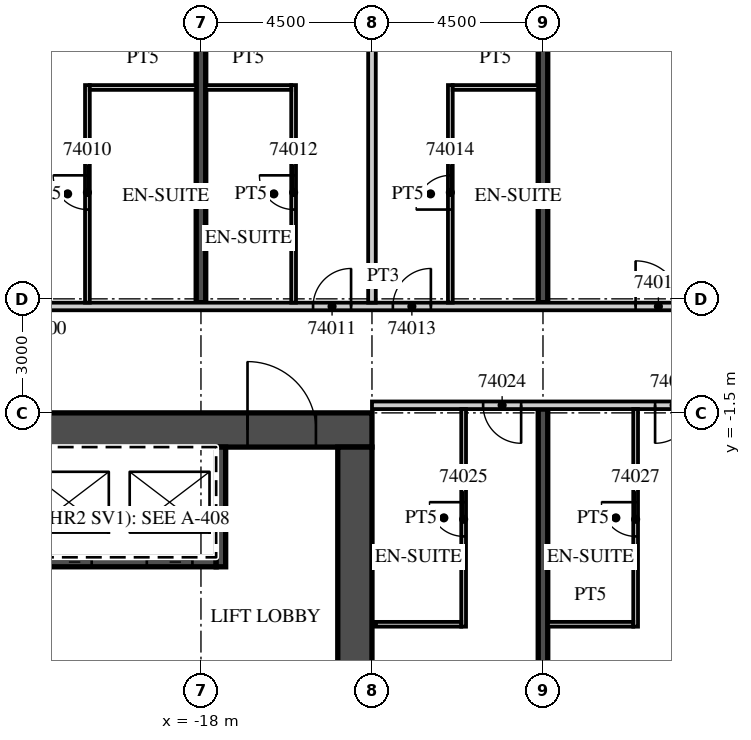
"""IFC4 building model, lengths in metres.
Left out: names, types, materials, properties, quantities, classifications, styles, units other than length and angle.
Written with IfcOpenShell. Run it as: python <this file> out.ifc"""

import sys

from ifc_helpers import new_model, si_unit, direction, frame, frame_2d, origin, place, context, subcontext, project, spatial, rectangle, extrude, element, fill, save


model = new_model("IFC4")
c1 = context("Model", 3, precision=1e-05, world=origin(), true_north=direction((0.0, 1.0)))
c2 = subcontext(c1, "Body", "Model", "MODEL_VIEW")
j1 = project(units=[si_unit("LENGTHUNIT", "METRE"), si_unit("PLANEANGLEUNIT", "RADIAN")], contexts=[c1])
p1 = place(None, origin())
s1 = spatial("IfcSite", under=j1, at=p1, CompositionType="ELEMENT")
p2 = place(p1, origin())
s2 = spatial("IfcBuilding", under=s1, at=p2, CompositionType="ELEMENT")
p3 = place(p2, frame((0.0, 0.0, 294.9)))
s3 = spatial("IfcBuildingStorey", under=s2, at=p3, CompositionType="ELEMENT", Elevation=294.9)
p4 = place(p3, frame((-18.0, 1.4, 0.0), z_axis=(0.0, 0.0, 1.0), x_axis=(0.0, 1.0, 0.0)))
e1 = element("IfcWall", 1, at=p4, inside=s3, PredefinedType="SHEAR", context=c2, shape_type="SweptSolid", body=[
    extrude(rectangle(XDim=16.03, YDim=0.25, at=frame_2d((8.015, 0.0))), origin(), (0.0, 0.0, 1.0), 3.3),
])
p5 = place(p3, frame((-9.0, -20.94, 0.0), z_axis=(0.0, 0.0, 1.0), x_axis=(0.0, 1.0, 0.0)))
e2 = element("IfcWall", 2, at=p5, inside=s3, PredefinedType="SHEAR", context=c2, shape_type="SweptSolid", body=[
    extrude(rectangle(XDim=19.541, YDim=0.25, at=frame_2d((9.77, 0.0))), origin(), (0.0, 0.0, 1.0), 3.3),
])
p6 = place(p3, frame((-9.0, 1.4, 0.0), z_axis=(0.0, 0.0, 1.0), x_axis=(0.0, 1.0, 0.0)))
e3 = element("IfcWall", 3, at=p6, inside=s3, PredefinedType="SHEAR", context=c2, shape_type="SweptSolid", body=[
    extrude(rectangle(XDim=16.896, YDim=0.25, at=frame_2d((8.448, 0.0))), origin(), (0.0, 0.0, 1.0), 3.3),
])
p7 = place(p3, frame((-39.909, 1.3, 0.0), z_axis=(0.0, 0.0, 1.0), x_axis=(1.0, 0.0, 0.0)))
e4 = element("IfcWall", 4, at=p7, inside=s3, PredefinedType="PARTITIONING", context=c2, shape_type="SweptSolid", body=[
    extrude(rectangle(XDim=53.409, YDim=0.2, at=frame_2d((26.705, 0.0))), origin(), (0.0, 0.0, 1.0), 3.02),
])
p8 = place(p7, frame((0.255, 0.0, 0.0)))
e5 = element("IfcOpeningElement", 5, at=p8, cuts=e4, PredefinedType="OPENING", context=c2, shape_type="SweptSolid", body=[
    extrude(rectangle(XDim=0.9, YDim=2.1, at=frame_2d((0.45, 1.05))), frame((0.0, 0.11, 0.0), z_axis=(0.0, -1.0, 0.0), x_axis=(1.0, 0.0, 0.0)), (0.0, 0.0, 1.0), 0.22),
])
p9 = place(p7, frame((4.484, 0.0, 0.0)))
e6 = element("IfcOpeningElement", 6, at=p9, cuts=e4, PredefinedType="OPENING", context=c2, shape_type="SweptSolid", body=[
    extrude(rectangle(XDim=1.0, YDim=2.1, at=frame_2d((0.5, 1.05))), frame((0.0, 0.11, 0.0), z_axis=(0.0, -1.0, 0.0), x_axis=(1.0, 0.0, 0.0)), (0.0, 0.0, 1.0), 0.22),
])
p10 = place(p7, frame((11.334, 0.0, 0.0)))
e7 = element("IfcOpeningElement", 7, at=p10, cuts=e4, PredefinedType="OPENING", context=c2, shape_type="SweptSolid", body=[
    extrude(rectangle(XDim=1.0, YDim=2.1, at=frame_2d((0.5, 1.05))), frame((0.0, 0.11, 0.0), z_axis=(0.0, -1.0, 0.0), x_axis=(1.0, 0.0, 0.0)), (0.0, 0.0, 1.0), 0.22),
])
p11 = place(p7, frame((15.347, 0.0, 0.0)))
e8 = element("IfcOpeningElement", 8, at=p11, cuts=e4, PredefinedType="OPENING", context=c2, shape_type="SweptSolid", body=[
    extrude(rectangle(XDim=1.2, YDim=2.1, at=frame_2d((0.6, 1.05))), frame((0.0, 0.11, 0.0), z_axis=(0.0, -1.0, 0.0), x_axis=(1.0, 0.0, 0.0)), (0.0, 0.0, 1.0), 0.22),
])
p12 = place(p7, frame((24.859, 0.0, 0.0)))
e9 = element("IfcOpeningElement", 9, at=p12, cuts=e4, PredefinedType="OPENING", context=c2, shape_type="SweptSolid", body=[
    extrude(rectangle(XDim=1.0, YDim=2.1, at=frame_2d((0.5, 1.05))), frame((0.0, 0.11, 0.0), z_axis=(0.0, -1.0, 0.0), x_axis=(1.0, 0.0, 0.0)), (0.0, 0.0, 1.0), 0.22),
])
p13 = place(p7, frame((26.959, 0.0, 0.0)))
e10 = element("IfcOpeningElement", 10, at=p13, cuts=e4, PredefinedType="OPENING", context=c2, shape_type="SweptSolid", body=[
    extrude(rectangle(XDim=1.0, YDim=2.1, at=frame_2d((0.5, 1.05))), frame((0.0, 0.11, 0.0), z_axis=(0.0, -1.0, 0.0), x_axis=(1.0, 0.0, 0.0)), (0.0, 0.0, 1.0), 0.22),
])
p14 = place(p7, frame((33.346, 0.0, 0.0)))
e11 = element("IfcOpeningElement", 11, at=p14, cuts=e4, PredefinedType="OPENING", context=c2, shape_type="SweptSolid", body=[
    extrude(rectangle(XDim=1.2, YDim=2.1, at=frame_2d((0.6, 1.05))), frame((0.0, 0.11, 0.0), z_axis=(0.0, -1.0, 0.0), x_axis=(1.0, 0.0, 0.0)), (0.0, 0.0, 1.0), 0.22),
])
p15 = place(p7, frame((42.859, 0.0, 0.0)))
e12 = element("IfcOpeningElement", 12, at=p15, cuts=e4, PredefinedType="OPENING", context=c2, shape_type="SweptSolid", body=[
    extrude(rectangle(XDim=1.0, YDim=2.1, at=frame_2d((0.5, 1.05))), frame((0.0, 0.11, 0.0), z_axis=(0.0, -1.0, 0.0), x_axis=(1.0, 0.0, 0.0)), (0.0, 0.0, 1.0), 0.22),
])
p16 = place(p7, frame((44.959, 0.0, 0.0)))
e13 = element("IfcOpeningElement", 13, at=p16, cuts=e4, PredefinedType="OPENING", context=c2, shape_type="SweptSolid", body=[
    extrude(rectangle(XDim=1.0, YDim=2.1, at=frame_2d((0.5, 1.05))), frame((0.0, 0.11, 0.0), z_axis=(0.0, -1.0, 0.0), x_axis=(1.0, 0.0, 0.0)), (0.0, 0.0, 1.0), 0.22),
])
p17 = place(p7, frame((49.484, 0.0, 0.0)))
e14 = element("IfcOpeningElement", 14, at=p17, cuts=e4, PredefinedType="OPENING", context=c2, shape_type="SweptSolid", body=[
    extrude(rectangle(XDim=1.0, YDim=2.1, at=frame_2d((0.5, 1.05))), frame((0.0, 0.11, 0.0), z_axis=(0.0, -1.0, 0.0), x_axis=(1.0, 0.0, 0.0)), (0.0, 0.0, 1.0), 0.22),
])
p18 = place(p3, frame((-20.988, 1.4, 0.0), z_axis=(0.0, 0.0, 1.0), x_axis=(0.0, 1.0, 0.0)))
e15 = element("IfcWall", 15, at=p18, inside=s3, PredefinedType="PARTITIONING", context=c2, shape_type="SweptSolid", body=[
    extrude(rectangle(XDim=5.725, YDim=0.125, at=frame_2d((2.863, 0.0))), origin(), (0.0, 0.0, 1.0), 3.02),
])
p19 = place(p18, frame((2.45, 0.0, 0.0)))
e16 = element("IfcOpeningElement", 16, at=p19, cuts=e15, PredefinedType="OPENING", context=c2, shape_type="SweptSolid", body=[
    extrude(rectangle(XDim=0.9, YDim=2.1, at=frame_2d((0.45, 1.05))), frame((0.0, 0.073, 0.0), z_axis=(0.0, -1.0, 0.0), x_axis=(1.0, 0.0, 0.0)), (0.0, 0.0, 1.0), 0.145),
])
p20 = place(p3, frame((-20.925, 7.062, 0.0), z_axis=(0.0, 0.0, 1.0), x_axis=(1.0, 0.0, 0.0)))
e17 = element("IfcWall", 17, at=p20, inside=s3, PredefinedType="PARTITIONING", context=c2, shape_type="SweptSolid", body=[
    extrude(rectangle(XDim=2.8, YDim=0.125, at=frame_2d((1.4, 0.0))), origin(), (0.0, 0.0, 1.0), 3.02),
])
p21 = place(p3, frame((-13.5, 1.4, 0.0), z_axis=(0.0, 0.0, 1.0), x_axis=(0.0, 1.0, 0.0)))
e18 = element("IfcWall", 18, at=p21, inside=s3, PredefinedType="PARTITIONING", context=c2, shape_type="SweptSolid", body=[
    extrude(rectangle(XDim=16.485, YDim=0.2, at=frame_2d((8.243, 0.0))), origin(), (0.0, 0.0, 1.0), 3.02),
])
p22 = place(p3, frame((-15.562, 1.4, 0.0), z_axis=(0.0, 0.0, 1.0), x_axis=(0.0, 1.0, 0.0)))
e19 = element("IfcWall", 19, at=p22, inside=s3, PredefinedType="PARTITIONING", context=c2, shape_type="SweptSolid", body=[
    extrude(rectangle(XDim=5.725, YDim=0.125, at=frame_2d((2.863, 0.0))), origin(), (0.0, 0.0, 1.0), 3.02),
])
p23 = place(p22, frame((2.45, 0.0, 0.0)))
e20 = element("IfcOpeningElement", 20, at=p23, cuts=e19, PredefinedType="OPENING", context=c2, shape_type="SweptSolid", body=[
    extrude(rectangle(XDim=0.9, YDim=2.1, at=frame_2d((0.45, 1.05))), frame((0.0, 0.073, 0.0), z_axis=(0.0, -1.0, 0.0), x_axis=(1.0, 0.0, 0.0)), (0.0, 0.0, 1.0), 0.145),
])
p24 = place(p3, frame((-17.875, 7.062, 0.0), z_axis=(0.0, 0.0, 1.0), x_axis=(1.0, 0.0, 0.0)))
e21 = element("IfcWall", 21, at=p24, inside=s3, PredefinedType="PARTITIONING", context=c2, shape_type="SweptSolid", body=[
    extrude(rectangle(XDim=2.25, YDim=0.125, at=frame_2d((1.125, 0.0))), origin(), (0.0, 0.0, 1.0), 3.02),
])
p25 = place(p3, frame((-11.438, 1.4, 0.0), z_axis=(0.0, 0.0, 1.0), x_axis=(0.0, 1.0, 0.0)))
e22 = element("IfcWall", 22, at=p25, inside=s3, PredefinedType="PARTITIONING", context=c2, shape_type="SweptSolid", body=[
    extrude(rectangle(XDim=5.725, YDim=0.125, at=frame_2d((2.863, 0.0))), origin(), (0.0, 0.0, 1.0), 3.02),
])
p26 = place(p25, frame((2.45, 0.0, 0.0)))
e23 = element("IfcOpeningElement", 23, at=p26, cuts=e22, PredefinedType="OPENING", context=c2, shape_type="SweptSolid", body=[
    extrude(rectangle(XDim=0.9, YDim=2.1, at=frame_2d((0.45, 1.05))), frame((0.0, 0.073, 0.0), z_axis=(0.0, -1.0, 0.0), x_axis=(1.0, 0.0, 0.0)), (0.0, 0.0, 1.0), 0.145),
])
p27 = place(p3, frame((-11.375, 7.062, 0.0), z_axis=(0.0, 0.0, 1.0), x_axis=(1.0, 0.0, 0.0)))
e24 = element("IfcWall", 24, at=p27, inside=s3, PredefinedType="PARTITIONING", context=c2, shape_type="SweptSolid", body=[
    extrude(rectangle(XDim=2.25, YDim=0.125, at=frame_2d((1.125, 0.0))), origin(), (0.0, 0.0, 1.0), 3.02),
])
p28 = place(p3, frame((-13.5, -1.3, 0.0), z_axis=(0.0, 0.0, 1.0), x_axis=(1.0, 0.0, 0.0)))
e25 = element("IfcWall", 25, at=p28, inside=s3, PredefinedType="PARTITIONING", context=c2, shape_type="SweptSolid", body=[
    extrude(rectangle(XDim=50.293, YDim=0.2, at=frame_2d((25.146, 0.0))), origin(), (0.0, 0.0, 1.0), 3.02),
])
p29 = place(p28, frame((2.925, 0.0, 0.0)))
e26 = element("IfcOpeningElement", 26, at=p29, cuts=e25, PredefinedType="OPENING", context=c2, shape_type="SweptSolid", body=[
    extrude(rectangle(XDim=1.0, YDim=2.1, at=frame_2d((0.5, 1.05))), frame((0.0, 0.11, 0.0), z_axis=(0.0, -1.0, 0.0), x_axis=(1.0, 0.0, 0.0)), (0.0, 0.0, 1.0), 0.22),
])
p30 = place(p28, frame((7.45, 0.0, 0.0)))
e27 = element("IfcOpeningElement", 27, at=p30, cuts=e25, PredefinedType="OPENING", context=c2, shape_type="SweptSolid", body=[
    extrude(rectangle(XDim=1.0, YDim=2.1, at=frame_2d((0.5, 1.05))), frame((0.0, 0.11, 0.0), z_axis=(0.0, -1.0, 0.0), x_axis=(1.0, 0.0, 0.0)), (0.0, 0.0, 1.0), 0.22),
])
p31 = place(p28, frame((9.55, 0.0, 0.0)))
e28 = element("IfcOpeningElement", 28, at=p31, cuts=e25, PredefinedType="OPENING", context=c2, shape_type="SweptSolid", body=[
    extrude(rectangle(XDim=1.0, YDim=2.1, at=frame_2d((0.5, 1.05))), frame((0.0, 0.11, 0.0), z_axis=(0.0, -1.0, 0.0), x_axis=(1.0, 0.0, 0.0)), (0.0, 0.0, 1.0), 0.22),
])
p32 = place(p28, frame((18.862, 0.0, 0.0)))
e29 = element("IfcOpeningElement", 29, at=p32, cuts=e25, PredefinedType="OPENING", context=c2, shape_type="SweptSolid", body=[
    extrude(rectangle(XDim=1.2, YDim=2.1, at=frame_2d((0.6, 1.05))), frame((0.0, 0.11, 0.0), z_axis=(0.0, -1.0, 0.0), x_axis=(1.0, 0.0, 0.0)), (0.0, 0.0, 1.0), 0.22),
])
p33 = place(p28, frame((23.075, 0.0, 0.0)))
e30 = element("IfcOpeningElement", 30, at=p33, cuts=e25, PredefinedType="OPENING", context=c2, shape_type="SweptSolid", body=[
    extrude(rectangle(XDim=1.0, YDim=2.1, at=frame_2d((0.5, 1.05))), frame((0.0, 0.11, 0.0), z_axis=(0.0, -1.0, 0.0), x_axis=(1.0, 0.0, 0.0)), (0.0, 0.0, 1.0), 0.22),
])
p34 = place(p28, frame((29.925, 0.0, 0.0)))
e31 = element("IfcOpeningElement", 31, at=p34, cuts=e25, PredefinedType="OPENING", context=c2, shape_type="SweptSolid", body=[
    extrude(rectangle(XDim=1.0, YDim=2.1, at=frame_2d((0.5, 1.05))), frame((0.0, 0.11, 0.0), z_axis=(0.0, -1.0, 0.0), x_axis=(1.0, 0.0, 0.0)), (0.0, 0.0, 1.0), 0.22),
])
p35 = place(p28, frame((33.938, 0.0, 0.0)))
e32 = element("IfcOpeningElement", 32, at=p35, cuts=e25, PredefinedType="OPENING", context=c2, shape_type="SweptSolid", body=[
    extrude(rectangle(XDim=1.2, YDim=2.1, at=frame_2d((0.6, 1.05))), frame((0.0, 0.11, 0.0), z_axis=(0.0, -1.0, 0.0), x_axis=(1.0, 0.0, 0.0)), (0.0, 0.0, 1.0), 0.22),
])
p36 = place(p28, frame((43.45, 0.0, 0.0)))
e33 = element("IfcOpeningElement", 33, at=p36, cuts=e25, PredefinedType="OPENING", context=c2, shape_type="SweptSolid", body=[
    extrude(rectangle(XDim=1.0, YDim=2.1, at=frame_2d((0.5, 1.05))), frame((0.0, 0.11, 0.0), z_axis=(0.0, -1.0, 0.0), x_axis=(1.0, 0.0, 0.0)), (0.0, 0.0, 1.0), 0.22),
])
p37 = place(p28, frame((45.55, 0.0, 0.0)))
e34 = element("IfcOpeningElement", 34, at=p37, cuts=e25, PredefinedType="OPENING", context=c2, shape_type="SweptSolid", body=[
    extrude(rectangle(XDim=1.0, YDim=2.1, at=frame_2d((0.5, 1.05))), frame((0.0, 0.11, 0.0), z_axis=(0.0, -1.0, 0.0), x_axis=(1.0, 0.0, 0.0)), (0.0, 0.0, 1.0), 0.22),
])
p38 = place(p3, frame((-11.088, -7.125, 0.0), z_axis=(0.0, 0.0, 1.0), x_axis=(0.0, 1.0, 0.0)))
e35 = element("IfcWall", 35, at=p38, inside=s3, PredefinedType="PARTITIONING", context=c2, shape_type="SweptSolid", body=[
    extrude(rectangle(XDim=5.725, YDim=0.125, at=frame_2d((2.863, 0.0))), origin(), (0.0, 0.0, 1.0), 3.02),
])
p39 = place(p38, frame((2.375, 0.0, 0.0)))
e36 = element("IfcOpeningElement", 36, at=p39, cuts=e35, PredefinedType="OPENING", context=c2, shape_type="SweptSolid", body=[
    extrude(rectangle(XDim=0.9, YDim=2.1, at=frame_2d((0.45, 1.05))), frame((0.0, 0.073, 0.0), z_axis=(0.0, -1.0, 0.0), x_axis=(1.0, 0.0, 0.0)), (0.0, 0.0, 1.0), 0.145),
])
p40 = place(p3, frame((-13.4, -7.062, 0.0), z_axis=(0.0, 0.0, 1.0), x_axis=(1.0, 0.0, 0.0)))
e37 = element("IfcWall", 37, at=p40, inside=s3, PredefinedType="PARTITIONING", context=c2, shape_type="SweptSolid", body=[
    extrude(rectangle(XDim=2.25, YDim=0.125, at=frame_2d((1.125, 0.0))), origin(), (0.0, 0.0, 1.0), 3.02),
])
p41 = place(p3, frame((-6.562, -7.125, 0.0), z_axis=(0.0, 0.0, 1.0), x_axis=(0.0, 1.0, 0.0)))
e38 = element("IfcWall", 38, at=p41, inside=s3, PredefinedType="PARTITIONING", context=c2, shape_type="SweptSolid", body=[
    extrude(rectangle(XDim=5.725, YDim=0.125, at=frame_2d((2.863, 0.0))), origin(), (0.0, 0.0, 1.0), 3.02),
])
p42 = place(p41, frame((2.375, 0.0, 0.0)))
e39 = element("IfcOpeningElement", 39, at=p42, cuts=e38, PredefinedType="OPENING", context=c2, shape_type="SweptSolid", body=[
    extrude(rectangle(XDim=0.9, YDim=2.1, at=frame_2d((0.45, 1.05))), frame((0.0, 0.073, 0.0), z_axis=(0.0, -1.0, 0.0), x_axis=(1.0, 0.0, 0.0)), (0.0, 0.0, 1.0), 0.145),
])
p43 = place(p3, frame((-8.875, -7.062, 0.0), z_axis=(0.0, 0.0, 1.0), x_axis=(1.0, 0.0, 0.0)))
e40 = element("IfcWall", 40, at=p43, inside=s3, PredefinedType="PARTITIONING", context=c2, shape_type="SweptSolid", body=[
    extrude(rectangle(XDim=2.25, YDim=0.125, at=frame_2d((1.125, 0.0))), origin(), (0.0, 0.0, 1.0), 3.02),
])
p44 = place(p3, frame((-31.5, -1.95, 0.0), z_axis=(0.0, 0.0, 1.0), x_axis=(1.0, 0.0, 0.0)))
e41 = element("IfcWall", 41, at=p44, inside=s3, PredefinedType="SHEAR", context=c2, shape_type="SweptSolid", body=[
    extrude(rectangle(XDim=18.0, YDim=0.9, at=frame_2d((9.0, 0.0))), origin(), (0.0, 0.0, 1.0), 3.02),
])
p45 = place(p44, frame((14.725, 0.0, 0.0)))
e42 = element("IfcOpeningElement", 42, at=p45, cuts=e41, PredefinedType="OPENING", context=c2, shape_type="SweptSolid", body=[
    extrude(rectangle(XDim=1.8, YDim=2.1, at=frame_2d((0.9, 1.05))), frame((0.0, 0.46, 0.0), z_axis=(0.0, -1.0, 0.0), x_axis=(1.0, 0.0, 0.0)), (0.0, 0.0, 1.0), 0.92),
])
p46 = place(p3, frame((-13.95, -14.6, 0.0), z_axis=(0.0, 0.0, 1.0), x_axis=(0.0, 1.0, 0.0)))
e43 = element("IfcWall", 43, at=p46, inside=s3, PredefinedType="SHEAR", context=c2, shape_type="SweptSolid", body=[
    extrude(rectangle(XDim=12.2, YDim=0.9, at=frame_2d((6.1, 0.0))), origin(), (0.0, 0.0, 1.0), 3.02),
])
p47 = place(p3, frame((-30.6, -5.425, 0.0), z_axis=(0.0, 0.0, 1.0), x_axis=(1.0, 0.0, 0.0)))
e44 = element("IfcWall", 44, at=p47, inside=s3, PredefinedType="SHEAR", context=c2, shape_type="SweptSolid", body=[
    extrude(rectangle(XDim=13.0, YDim=0.25, at=frame_2d((6.5, 0.0))), origin(), (0.0, 0.0, 1.0), 3.02),
])
p48 = place(p47, frame((8.525, 0.0, 0.0)))
e45 = element("IfcOpeningElement", 45, at=p48, cuts=e44, PredefinedType="OPENING", context=c2, shape_type="SweptSolid", body=[
    extrude(rectangle(XDim=1.2, YDim=2.1, at=frame_2d((0.6, 1.05))), frame((0.0, 0.135, 0.0), z_axis=(0.0, -1.0, 0.0), x_axis=(1.0, 0.0, 0.0)), (0.0, 0.0, 1.0), 0.27),
])
p49 = place(p47, frame((11.175, 0.0, 0.0)))
e46 = element("IfcOpeningElement", 46, at=p49, cuts=e44, PredefinedType="OPENING", context=c2, shape_type="SweptSolid", body=[
    extrude(rectangle(XDim=1.2, YDim=2.1, at=frame_2d((0.6, 1.05))), frame((0.0, 0.135, 0.0), z_axis=(0.0, -1.0, 0.0), x_axis=(1.0, 0.0, 0.0)), (0.0, 0.0, 1.0), 0.27),
])
p50 = place(p47, frame((4.725, 0.0, 0.0)))
e47 = element("IfcOpeningElement", 47, at=p50, cuts=e44, PredefinedType="OPENING", context=c2, shape_type="SweptSolid", body=[
    extrude(rectangle(XDim=1.0, YDim=2.1, at=frame_2d((0.5, 1.05))), frame((0.0, 0.135, 0.0), z_axis=(0.0, -1.0, 0.0), x_axis=(1.0, 0.0, 0.0)), (0.0, 0.0, 1.0), 0.27),
])
p51 = place(p3, frame((-17.475, -5.55, 0.0), z_axis=(0.0, 0.0, 1.0), x_axis=(0.0, 1.0, 0.0)))
e48 = element("IfcWall", 48, at=p51, inside=s3, PredefinedType="SHEAR", context=c2, shape_type="SweptSolid", body=[
    extrude(rectangle(XDim=3.15, YDim=0.25, at=frame_2d((1.575, 0.0))), origin(), (0.0, 0.0, 1.0), 3.02),
])
p52 = place(p19, origin())
e49 = element("IfcDoor", 49, at=p52, inside=s3, OperationType="SINGLE_SWING_RIGHT", PredefinedType="DOOR", context=c2, shape_type="SweptSolid", body=[
    extrude(rectangle(XDim=0.9, YDim=2.1, at=frame_2d((0.45, 1.05))), frame((0.0, 0.025, 0.0), z_axis=(0.0, -1.0, 0.0), x_axis=(1.0, 0.0, 0.0)), (0.0, 0.0, 1.0), 0.05),
])
fill(e16, e49)
p53 = place(p12, origin())
e50 = element("IfcDoor", 50, at=p53, inside=s3, OperationType="SINGLE_SWING_RIGHT", PredefinedType="DOOR", context=c2, shape_type="SweptSolid", body=[
    extrude(rectangle(XDim=1.0, YDim=2.1, at=frame_2d((0.5, 1.05))), frame((0.0, 0.025, 0.0), z_axis=(0.0, -1.0, 0.0), x_axis=(1.0, 0.0, 0.0)), (0.0, 0.0, 1.0), 0.05),
])
fill(e9, e50)
p54 = place(p23, origin())
e51 = element("IfcDoor", 51, at=p54, inside=s3, OperationType="SINGLE_SWING_RIGHT", PredefinedType="DOOR", context=c2, shape_type="SweptSolid", body=[
    extrude(rectangle(XDim=0.9, YDim=2.1, at=frame_2d((0.45, 1.05))), frame((0.0, 0.025, 0.0), z_axis=(0.0, -1.0, 0.0), x_axis=(1.0, 0.0, 0.0)), (0.0, 0.0, 1.0), 0.05),
])
fill(e20, e51)
p55 = place(p13, origin())
e52 = element("IfcDoor", 52, at=p55, inside=s3, OperationType="SINGLE_SWING_RIGHT", PredefinedType="DOOR", context=c2, shape_type="SweptSolid", body=[
    extrude(rectangle(XDim=1.0, YDim=2.1, at=frame_2d((0.5, 1.05))), frame((0.0, 0.025, 0.0), z_axis=(0.0, -1.0, 0.0), x_axis=(1.0, 0.0, 0.0)), (0.0, 0.0, 1.0), 0.05),
])
fill(e10, e52)
p56 = place(p26, origin())
e53 = element("IfcDoor", 53, at=p56, inside=s3, OperationType="SINGLE_SWING_LEFT", PredefinedType="DOOR", context=c2, shape_type="SweptSolid", body=[
    extrude(rectangle(XDim=0.9, YDim=2.1, at=frame_2d((0.45, 1.05))), frame((0.0, 0.025, 0.0), z_axis=(0.0, -1.0, 0.0), x_axis=(1.0, 0.0, 0.0)), (0.0, 0.0, 1.0), 0.05),
])
fill(e23, e53)
p57 = place(p14, origin())
e54 = element("IfcDoor", 54, at=p57, inside=s3, OperationType="SINGLE_SWING_LEFT", PredefinedType="DOOR", context=c2, shape_type="SweptSolid", body=[
    extrude(rectangle(XDim=1.2, YDim=2.1, at=frame_2d((0.6, 1.05))), frame((0.0, 0.025, 0.0), z_axis=(0.0, -1.0, 0.0), x_axis=(1.0, 0.0, 0.0)), (0.0, 0.0, 1.0), 0.05),
])
fill(e11, e54)
p58 = place(p29, origin())
e55 = element("IfcDoor", 55, at=p58, inside=s3, OperationType="SINGLE_SWING_RIGHT", PredefinedType="DOOR", context=c2, shape_type="SweptSolid", body=[
    extrude(rectangle(XDim=1.0, YDim=2.1, at=frame_2d((0.5, 1.05))), frame((0.0, 0.025, 0.0), z_axis=(0.0, -1.0, 0.0), x_axis=(1.0, 0.0, 0.0)), (0.0, 0.0, 1.0), 0.05),
])
fill(e26, e55)
p59 = place(p39, origin())
e56 = element("IfcDoor", 56, at=p59, inside=s3, OperationType="SINGLE_SWING_RIGHT", PredefinedType="DOOR", context=c2, shape_type="SweptSolid", body=[
    extrude(rectangle(XDim=0.9, YDim=2.1, at=frame_2d((0.45, 1.05))), frame((0.0, 0.025, 0.0), z_axis=(0.0, -1.0, 0.0), x_axis=(1.0, 0.0, 0.0)), (0.0, 0.0, 1.0), 0.05),
])
fill(e36, e56)
p60 = place(p30, origin())
e57 = element("IfcDoor", 57, at=p60, inside=s3, OperationType="SINGLE_SWING_LEFT", PredefinedType="DOOR", context=c2, shape_type="SweptSolid", body=[
    extrude(rectangle(XDim=1.0, YDim=2.1, at=frame_2d((0.5, 1.05))), frame((0.0, 0.025, 0.0), z_axis=(0.0, -1.0, 0.0), x_axis=(1.0, 0.0, 0.0)), (0.0, 0.0, 1.0), 0.05),
])
fill(e27, e57)
p61 = place(p42, origin())
e58 = element("IfcDoor", 58, at=p61, inside=s3, OperationType="SINGLE_SWING_RIGHT", PredefinedType="DOOR", context=c2, shape_type="SweptSolid", body=[
    extrude(rectangle(XDim=0.9, YDim=2.1, at=frame_2d((0.45, 1.05))), frame((0.0, 0.025, 0.0), z_axis=(0.0, -1.0, 0.0), x_axis=(1.0, 0.0, 0.0)), (0.0, 0.0, 1.0), 0.05),
])
fill(e39, e58)
p62 = place(p48, origin())
e59 = element("IfcDoor", 59, at=p62, inside=s3, OperationType="SLIDING_TO_LEFT", PredefinedType="DOOR", context=c2, shape_type="SweptSolid", body=[
    extrude(rectangle(XDim=1.2, YDim=2.1, at=frame_2d((0.6, 1.05))), frame((0.0, 0.025, 0.0), z_axis=(0.0, -1.0, 0.0), x_axis=(1.0, 0.0, 0.0)), (0.0, 0.0, 1.0), 0.05),
])
fill(e45, e59)
p63 = place(p49, origin())
e60 = element("IfcDoor", 60, at=p63, inside=s3, OperationType="SLIDING_TO_RIGHT", PredefinedType="DOOR", context=c2, shape_type="SweptSolid", body=[
    extrude(rectangle(XDim=1.2, YDim=2.1, at=frame_2d((0.6, 1.05))), frame((0.0, 0.025, 0.0), z_axis=(0.0, -1.0, 0.0), x_axis=(1.0, 0.0, 0.0)), (0.0, 0.0, 1.0), 0.05),
])
fill(e46, e60)
p64 = place(p45, origin())
e61 = element("IfcDoor", 61, at=p64, inside=s3, OperationType="DOUBLE_DOOR_DOUBLE_SWING", PredefinedType="DOOR", context=c2, shape_type="SweptSolid", body=[
    extrude(rectangle(XDim=1.8, YDim=2.1, at=frame_2d((0.9, 1.05))), frame((0.0, 0.025, 0.0), z_axis=(0.0, -1.0, 0.0), x_axis=(1.0, 0.0, 0.0)), (0.0, 0.0, 1.0), 0.05),
])
fill(e42, e61)
save(model, sys.argv[1])
